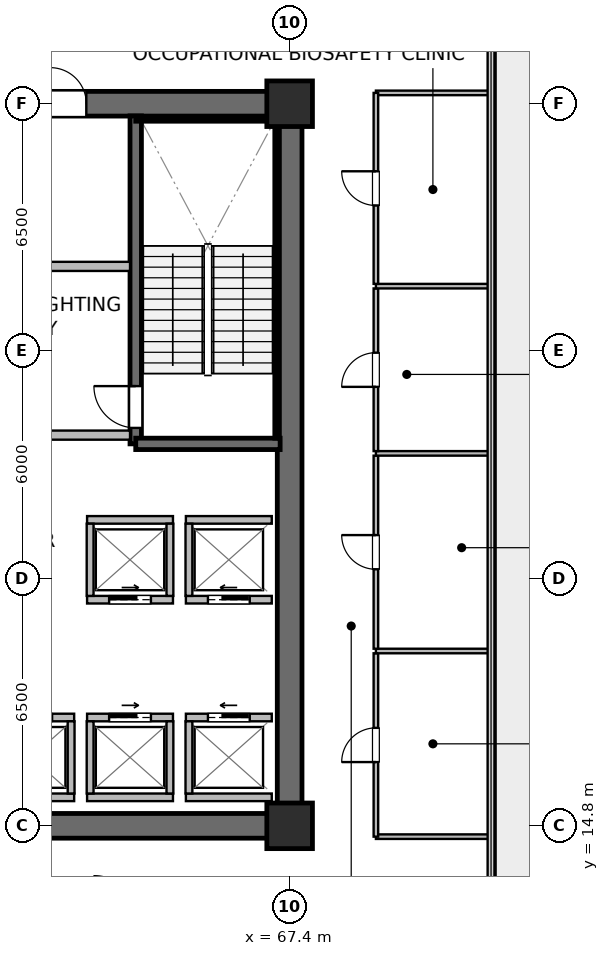
"""IFC4 building model, lengths in metres.
Left out: names, types, materials, properties, quantities, classifications, styles, units other than length and angle.
Written with IfcOpenShell. Run it as: python <this file> out.ifc"""

import sys

from ifc_helpers import new_model, si_unit, direction, frame, frame_2d, origin, origin_2d, place, context, subcontext, project, spatial, rectangle, extrude, source, transform, mapped, element, fill, save


model = new_model("IFC4")
c1 = context("Model", 3, precision=1e-05, world=origin(), true_north=direction((0.0, 1.0)))
c2 = subcontext(c1, "Body", "Model", "MODEL_VIEW")
j1 = project(units=[si_unit("LENGTHUNIT", "METRE"), si_unit("PLANEANGLEUNIT", "RADIAN")], contexts=[c1])
p1 = place(None, origin())
s1 = spatial("IfcSite", under=j1, at=p1, CompositionType="ELEMENT")
p2 = place(p1, origin())
s2 = spatial("IfcBuilding", under=s1, at=p2, CompositionType="ELEMENT")
p3 = place(p2, frame((0.0, 0.0, 100.3)))
s3 = spatial("IfcBuildingStorey", under=s2, at=p3, CompositionType="ELEMENT", Elevation=100.3)
p4 = place(p3, frame((52.275, 14.8, 0.0), z_axis=(0.0, 0.0, 1.0), x_axis=(1.0, 0.0, 0.0)))
e1 = element("IfcWall", 1, at=p4, inside=s3, PredefinedType="SHEAR", context=c2, shape_type="SweptSolid", body=[
    extrude(rectangle(XDim=15.45, YDim=0.65, at=frame_2d((7.725, 0.0))), origin(), (0.0, 0.0, 1.0), 4.49),
])
p5 = place(p3, frame((52.275, 33.8, 0.0), z_axis=(0.0, 0.0, 1.0), x_axis=(1.0, 0.0, 0.0)))
e2 = element("IfcWall", 2, at=p5, inside=s3, PredefinedType="SHEAR", context=c2, shape_type="SweptSolid", body=[
    extrude(rectangle(XDim=15.45, YDim=0.65, at=frame_2d((7.725, 0.0))), origin(), (0.0, 0.0, 1.0), 4.49),
])
p6 = place(p5, frame((8.825, 0.0, 0.0)))
e3 = element("IfcOpeningElement", 3, at=p6, cuts=e2, PredefinedType="OPENING", context=c2, shape_type="SweptSolid", body=[
    extrude(rectangle(XDim=0.95, YDim=2.15, at=frame_2d((0.475, 1.075))), frame((0.0, 0.335, 0.0), z_axis=(0.0, -1.0, 0.0), x_axis=(1.0, 0.0, 0.0)), (0.0, 0.0, 1.0), 0.67),
])
p7 = place(p5, frame((5.46, 0.0, 0.0)))
e4 = element("IfcOpeningElement", 4, at=p7, cuts=e2, PredefinedType="OPENING", context=c2, shape_type="SweptSolid", body=[
    extrude(rectangle(XDim=0.95, YDim=2.15, at=frame_2d((0.475, 1.075))), frame((0.0, 0.335, 0.0), z_axis=(0.0, -1.0, 0.0), x_axis=(1.0, 0.0, 0.0)), (0.0, 0.0, 1.0), 0.67),
])
p8 = place(p5, frame((2.06, 0.0, 0.0)))
e5 = element("IfcOpeningElement", 5, at=p8, cuts=e2, PredefinedType="OPENING", context=c2, shape_type="SweptSolid", body=[
    extrude(rectangle(XDim=0.95, YDim=2.15, at=frame_2d((0.475, 1.075))), frame((0.0, 0.335, 0.0), z_axis=(0.0, -1.0, 0.0), x_axis=(1.0, 0.0, 0.0)), (0.0, 0.0, 1.0), 0.67),
])
p9 = place(p3, frame((67.4, 15.125, 0.0), z_axis=(0.0, 0.0, 1.0), x_axis=(0.0, 1.0, 0.0)))
e6 = element("IfcWall", 6, at=p9, inside=s3, PredefinedType="SHEAR", context=c2, shape_type="SweptSolid", body=[
    extrude(rectangle(XDim=18.35, YDim=0.65, at=frame_2d((9.175, 0.0))), origin(), (0.0, 0.0, 1.0), 4.49),
])
p10 = place(p3, frame((63.35, 24.85, 0.0), z_axis=(0.0, 0.0, 1.0), x_axis=(0.0, 1.0, 0.0)))
e7 = element("IfcWall", 7, at=p10, inside=s3, PredefinedType="SHEAR", context=c2, shape_type="SweptSolid", body=[
    extrude(rectangle(XDim=8.63, YDim=0.3, at=frame_2d((4.315, 0.0))), origin(), (0.0, 0.0, 1.0), 4.49),
])
p11 = place(p10, frame((0.42, 0.0, 0.0)))
e8 = element("IfcOpeningElement", 8, at=p11, cuts=e7, PredefinedType="OPENING", context=c2, shape_type="SweptSolid", body=[
    extrude(rectangle(XDim=1.1, YDim=2.15, at=frame_2d((0.55, 1.075))), frame((0.0, 0.16, 0.0), z_axis=(0.0, -1.0, 0.0), x_axis=(1.0, 0.0, 0.0)), (0.0, 0.0, 1.0), 0.32),
])
p12 = place(p3, frame((63.35, 24.85, 0.0), z_axis=(0.0, 0.0, 1.0), x_axis=(1.0, 0.0, 0.0)))
e9 = element("IfcWall", 9, at=p12, inside=s3, PredefinedType="SHEAR", context=c2, shape_type="SweptSolid", body=[
    extrude(rectangle(XDim=3.8, YDim=0.3, at=frame_2d((1.9, 0.0))), origin(), (0.0, 0.0, 1.0), 4.49),
])
p13 = place(p3, frame((63.35, 33.4, 0.0), z_axis=(0.0, 0.0, 1.0), x_axis=(1.0, 0.0, 0.0)))
e10 = element("IfcWall", 10, at=p13, inside=s3, PredefinedType="SOLIDWALL", context=c2, shape_type="SweptSolid", body=[
    extrude(rectangle(XDim=3.72, YDim=0.12, at=frame_2d((1.86, 0.0))), origin(), (0.0, 0.0, 1.0), 4.49),
])
p14 = place(p3, frame((67.07, 25.0, 0.0), z_axis=(0.0, 0.0, 1.0), x_axis=(0.0, 1.0, 0.0)))
e11 = element("IfcWall", 11, at=p14, inside=s3, PredefinedType="SOLIDWALL", context=c2, shape_type="SweptSolid", body=[
    extrude(rectangle(XDim=8.32, YDim=0.12, at=frame_2d((4.16, 0.0))), origin(), (0.0, 0.0, 1.0), 4.49),
])
m1 = source(origin(), c2, "Body", "SweptSolid", [
    extrude(rectangle(XDim=1.2, YDim=1.2, at=origin_2d()), origin(), (0.0, 0.0, 1.0), 4.8),
])
for number, where, z_axis, x_axis in (
    (12, (67.4, 14.8, 0.0), (0.0, 0.0, 1.0), (1.0, 0.0, 0.0)),
    (13, (67.4, 33.8, 0.0), (0.0, 0.0, 1.0), (1.0, 0.0, 0.0)),
):
    element("IfcColumn", number, at=place(p3, frame(where, z_axis=z_axis, x_axis=x_axis)), inside=s3, PredefinedType="COLUMN", context=c2, shape_type="MappedRepresentation", body=[
        mapped(m1, transform((0.0, 0.0, 0.0), scale=1.0)),
    ])
p15 = place(p3, frame((56.28, 25.08, 0.0), z_axis=(0.0, 0.0, 1.0), x_axis=(1.0, 0.0, 0.0)))
e14 = element("IfcWall", 14, at=p15, inside=s3, PredefinedType="SOLIDWALL", context=c2, shape_type="SweptSolid", body=[
    extrude(rectangle(XDim=6.92, YDim=0.24, at=frame_2d((3.46, 0.0))), origin(), (0.0, 0.0, 1.0), 3.825),
])
p16 = place(p15, frame((2.6, 0.0, 0.0)))
e15 = element("IfcOpeningElement", 15, at=p16, cuts=e14, PredefinedType="OPENING", context=c2, shape_type="SweptSolid", body=[
    extrude(rectangle(XDim=1.2, YDim=2.16, at=frame_2d((0.6, 1.08))), frame((0.0, 0.13, 0.0), z_axis=(0.0, -1.0, 0.0), x_axis=(1.0, 0.0, 0.0)), (0.0, 0.0, 1.0), 0.26),
])
p17 = place(p3, frame((56.28, 29.52, 0.0), z_axis=(0.0, 0.0, 1.0), x_axis=(1.0, 0.0, 0.0)))
e16 = element("IfcWall", 16, at=p17, inside=s3, PredefinedType="SOLIDWALL", context=c2, shape_type="SweptSolid", body=[
    extrude(rectangle(XDim=6.92, YDim=0.24, at=frame_2d((3.46, 0.0))), origin(), (0.0, 0.0, 1.0), 3.825),
])
p18 = place(p3, frame((64.67, 17.65, 0.0), z_axis=(0.0, 0.0, 1.0), x_axis=(1.0, 0.0, 0.0)))
e17 = element("IfcWall", 17, at=p18, inside=s3, PredefinedType="SOLIDWALL", context=c2, shape_type="SweptSolid", body=[
    extrude(rectangle(XDim=2.26, YDim=0.2, at=frame_2d((1.13, 0.0))), origin(), (0.0, 0.0, 1.0), 4.49),
])
p19 = place(p18, frame((0.58, 0.0, 0.0)))
e18 = element("IfcOpeningElement", 18, at=p19, cuts=e17, PredefinedType="OPENING", context=c2, shape_type="SweptSolid", body=[
    extrude(rectangle(XDim=1.1, YDim=2.22, at=frame_2d((0.55, 1.11))), frame((0.0, 0.11, 0.0), z_axis=(0.0, -1.0, 0.0), x_axis=(1.0, 0.0, 0.0)), (0.0, 0.0, 1.0), 0.22),
])
p20 = place(p3, frame((64.67, 15.55, 0.0), z_axis=(0.0, 0.0, 1.0), x_axis=(1.0, 0.0, 0.0)))
e19 = element("IfcWall", 19, at=p20, inside=s3, PredefinedType="SOLIDWALL", context=c2, shape_type="SweptSolid", body=[
    extrude(rectangle(XDim=2.26, YDim=0.2, at=frame_2d((1.13, 0.0))), origin(), (0.0, 0.0, 1.0), 4.49),
])
p21 = place(p3, frame((64.75, 15.65, 0.0), z_axis=(0.0, 0.0, 1.0), x_axis=(0.0, 1.0, 0.0)))
e20 = element("IfcWall", 20, at=p21, inside=s3, PredefinedType="SOLIDWALL", context=c2, shape_type="SweptSolid", body=[
    extrude(rectangle(XDim=1.9, YDim=0.18, at=frame_2d((0.95, 0.0))), origin(), (0.0, 0.0, 1.0), 4.49),
])
p22 = place(p3, frame((62.07, 17.65, 0.0), z_axis=(0.0, 0.0, 1.0), x_axis=(1.0, 0.0, 0.0)))
e21 = element("IfcWall", 21, at=p22, inside=s3, PredefinedType="SOLIDWALL", context=c2, shape_type="SweptSolid", body=[
    extrude(rectangle(XDim=2.26, YDim=0.2, at=frame_2d((1.13, 0.0))), origin(), (0.0, 0.0, 1.0), 4.49),
])
p23 = place(p22, frame((0.58, 0.0, 0.0)))
e22 = element("IfcOpeningElement", 22, at=p23, cuts=e21, PredefinedType="OPENING", context=c2, shape_type="SweptSolid", body=[
    extrude(rectangle(XDim=1.1, YDim=2.22, at=frame_2d((0.55, 1.11))), frame((0.0, 0.11, 0.0), z_axis=(0.0, -1.0, 0.0), x_axis=(1.0, 0.0, 0.0)), (0.0, 0.0, 1.0), 0.22),
])
p24 = place(p3, frame((62.07, 15.55, 0.0), z_axis=(0.0, 0.0, 1.0), x_axis=(1.0, 0.0, 0.0)))
e23 = element("IfcWall", 23, at=p24, inside=s3, PredefinedType="SOLIDWALL", context=c2, shape_type="SweptSolid", body=[
    extrude(rectangle(XDim=2.26, YDim=0.2, at=frame_2d((1.13, 0.0))), origin(), (0.0, 0.0, 1.0), 4.49),
])
for number, where, z_axis, x_axis in (
    (24, (62.15, 15.65, 0.0), (0.0, 0.0, 1.0), (0.0, 1.0, 0.0)),
    (25, (64.25, 15.65, 0.0), (0.0, 0.0, 1.0), (0.0, 1.0, 0.0)),
):
    element("IfcWall", number, at=place(p3, frame(where, z_axis=z_axis, x_axis=x_axis)), inside=s3, PredefinedType="SOLIDWALL", context=c2, shape_type="SweptSolid", body=[
        extrude(rectangle(XDim=1.9, YDim=0.18, at=frame_2d((0.95, 0.0))), origin(), (0.0, 0.0, 1.0), 4.49),
    ])
p25 = place(p3, frame((59.47, 17.65, 0.0), z_axis=(0.0, 0.0, 1.0), x_axis=(1.0, 0.0, 0.0)))
e26 = element("IfcWall", 26, at=p25, inside=s3, PredefinedType="SOLIDWALL", context=c2, shape_type="SweptSolid", body=[
    extrude(rectangle(XDim=2.26, YDim=0.2, at=frame_2d((1.13, 0.0))), origin(), (0.0, 0.0, 1.0), 3.825),
])
p26 = place(p25, frame((0.58, 0.0, 0.0)))
e27 = element("IfcOpeningElement", 27, at=p26, cuts=e26, PredefinedType="OPENING", context=c2, shape_type="SweptSolid", body=[
    extrude(rectangle(XDim=1.1, YDim=2.22, at=frame_2d((0.55, 1.11))), frame((0.0, 0.11, 0.0), z_axis=(0.0, -1.0, 0.0), x_axis=(1.0, 0.0, 0.0)), (0.0, 0.0, 1.0), 0.22),
])
p27 = place(p3, frame((59.47, 15.55, 0.0), z_axis=(0.0, 0.0, 1.0), x_axis=(1.0, 0.0, 0.0)))
e28 = element("IfcWall", 28, at=p27, inside=s3, PredefinedType="SOLIDWALL", context=c2, shape_type="SweptSolid", body=[
    extrude(rectangle(XDim=2.26, YDim=0.2, at=frame_2d((1.13, 0.0))), origin(), (0.0, 0.0, 1.0), 3.825),
])
p28 = place(p3, frame((61.65, 15.65, 0.0), z_axis=(0.0, 0.0, 1.0), x_axis=(0.0, 1.0, 0.0)))
e29 = element("IfcWall", 29, at=p28, inside=s3, PredefinedType="SOLIDWALL", context=c2, shape_type="SweptSolid", body=[
    extrude(rectangle(XDim=1.9, YDim=0.18, at=frame_2d((0.95, 0.0))), origin(), (0.0, 0.0, 1.0), 4.49),
])
p29 = place(p3, frame((64.67, 20.75, 0.0), z_axis=(0.0, 0.0, 1.0), x_axis=(1.0, 0.0, 0.0)))
e30 = element("IfcWall", 30, at=p29, inside=s3, PredefinedType="SOLIDWALL", context=c2, shape_type="SweptSolid", body=[
    extrude(rectangle(XDim=2.26, YDim=0.2, at=frame_2d((1.13, 0.0))), origin(), (0.0, 0.0, 1.0), 4.49),
])
p30 = place(p29, frame((0.58, 0.0, 0.0)))
e31 = element("IfcOpeningElement", 31, at=p30, cuts=e30, PredefinedType="OPENING", context=c2, shape_type="SweptSolid", body=[
    extrude(rectangle(XDim=1.1, YDim=2.22, at=frame_2d((0.55, 1.11))), frame((0.0, 0.11, 0.0), z_axis=(0.0, -1.0, 0.0), x_axis=(1.0, 0.0, 0.0)), (0.0, 0.0, 1.0), 0.22),
])
p31 = place(p3, frame((64.67, 22.85, 0.0), z_axis=(0.0, 0.0, 1.0), x_axis=(1.0, 0.0, 0.0)))
e32 = element("IfcWall", 32, at=p31, inside=s3, PredefinedType="SOLIDWALL", context=c2, shape_type="SweptSolid", body=[
    extrude(rectangle(XDim=2.26, YDim=0.2, at=frame_2d((1.13, 0.0))), origin(), (0.0, 0.0, 1.0), 4.49),
])
p32 = place(p3, frame((64.75, 20.85, 0.0), z_axis=(0.0, 0.0, 1.0), x_axis=(0.0, 1.0, 0.0)))
e33 = element("IfcWall", 33, at=p32, inside=s3, PredefinedType="SOLIDWALL", context=c2, shape_type="SweptSolid", body=[
    extrude(rectangle(XDim=1.9, YDim=0.18, at=frame_2d((0.95, 0.0))), origin(), (0.0, 0.0, 1.0), 4.49),
])
p33 = place(p3, frame((62.07, 20.75, 0.0), z_axis=(0.0, 0.0, 1.0), x_axis=(1.0, 0.0, 0.0)))
e34 = element("IfcWall", 34, at=p33, inside=s3, PredefinedType="SOLIDWALL", context=c2, shape_type="SweptSolid", body=[
    extrude(rectangle(XDim=2.26, YDim=0.2, at=frame_2d((1.13, 0.0))), origin(), (0.0, 0.0, 1.0), 4.49),
])
p34 = place(p33, frame((0.58, 0.0, 0.0)))
e35 = element("IfcOpeningElement", 35, at=p34, cuts=e34, PredefinedType="OPENING", context=c2, shape_type="SweptSolid", body=[
    extrude(rectangle(XDim=1.1, YDim=2.22, at=frame_2d((0.55, 1.11))), frame((0.0, 0.11, 0.0), z_axis=(0.0, -1.0, 0.0), x_axis=(1.0, 0.0, 0.0)), (0.0, 0.0, 1.0), 0.22),
])
p35 = place(p3, frame((62.07, 22.85, 0.0), z_axis=(0.0, 0.0, 1.0), x_axis=(1.0, 0.0, 0.0)))
e36 = element("IfcWall", 36, at=p35, inside=s3, PredefinedType="SOLIDWALL", context=c2, shape_type="SweptSolid", body=[
    extrude(rectangle(XDim=2.26, YDim=0.2, at=frame_2d((1.13, 0.0))), origin(), (0.0, 0.0, 1.0), 4.49),
])
for number, where, z_axis, x_axis in (
    (37, (62.15, 20.85, 0.0), (0.0, 0.0, 1.0), (0.0, 1.0, 0.0)),
    (38, (64.25, 20.85, 0.0), (0.0, 0.0, 1.0), (0.0, 1.0, 0.0)),
):
    element("IfcWall", number, at=place(p3, frame(where, z_axis=z_axis, x_axis=x_axis)), inside=s3, PredefinedType="SOLIDWALL", context=c2, shape_type="SweptSolid", body=[
        extrude(rectangle(XDim=1.9, YDim=0.18, at=frame_2d((0.95, 0.0))), origin(), (0.0, 0.0, 1.0), 4.49),
    ])
for number, where, z_axis, x_axis in (
    (39, (69.67, 14.515, 0.0), (0.0, 0.0, 1.0), (1.0, 0.0, 0.0)),
    (40, (69.67, 34.085, 0.0), (0.0, 0.0, 1.0), (1.0, 0.0, 0.0)),
):
    element("IfcWall", number, at=place(p3, frame(where, z_axis=z_axis, x_axis=x_axis)), inside=s3, PredefinedType="PARTITIONING", context=c2, shape_type="SweptSolid", body=[
        extrude(rectangle(XDim=3.02, YDim=0.12, at=frame_2d((1.51, 0.0))), origin(), (0.0, 0.0, 1.0), 4.49),
    ])
p36 = place(p3, frame((69.67, 14.515, 0.0), z_axis=(0.0, 0.0, 1.0), x_axis=(0.0, 1.0, 0.0)))
e41 = element("IfcWall", 41, at=p36, inside=s3, PredefinedType="PARTITIONING", context=c2, shape_type="SweptSolid", body=[
    extrude(rectangle(XDim=4.825, YDim=0.12, at=frame_2d((2.413, 0.0))), origin(), (0.0, 0.0, 1.0), 4.49),
])
p37 = place(p36, frame((1.962, 0.0, 0.0)))
e42 = element("IfcOpeningElement", 42, at=p37, cuts=e41, PredefinedType="OPENING", context=c2, shape_type="SweptSolid", body=[
    extrude(rectangle(XDim=0.9, YDim=2.1, at=frame_2d((0.45, 1.05))), frame((0.0, 0.07, 0.0), z_axis=(0.0, -1.0, 0.0), x_axis=(1.0, 0.0, 0.0)), (0.0, 0.0, 1.0), 0.14),
])
p38 = place(p3, frame((69.67, 19.4, 0.0), z_axis=(0.0, 0.0, 1.0), x_axis=(1.0, 0.0, 0.0)))
e43 = element("IfcWall", 43, at=p38, inside=s3, PredefinedType="PARTITIONING", context=c2, shape_type="SweptSolid", body=[
    extrude(rectangle(XDim=3.02, YDim=0.12, at=frame_2d((1.51, 0.0))), origin(), (0.0, 0.0, 1.0), 4.49),
])
p39 = place(p3, frame((69.67, 19.46, 0.0), z_axis=(0.0, 0.0, 1.0), x_axis=(0.0, 1.0, 0.0)))
e44 = element("IfcWall", 44, at=p39, inside=s3, PredefinedType="PARTITIONING", context=c2, shape_type="SweptSolid", body=[
    extrude(rectangle(XDim=5.08, YDim=0.12, at=frame_2d((2.54, 0.0))), origin(), (0.0, 0.0, 1.0), 4.49),
])
p40 = place(p39, frame((2.09, 0.0, 0.0)))
e45 = element("IfcOpeningElement", 45, at=p40, cuts=e44, PredefinedType="OPENING", context=c2, shape_type="SweptSolid", body=[
    extrude(rectangle(XDim=0.9, YDim=2.1, at=frame_2d((0.45, 1.05))), frame((0.0, 0.07, 0.0), z_axis=(0.0, -1.0, 0.0), x_axis=(1.0, 0.0, 0.0)), (0.0, 0.0, 1.0), 0.14),
])
p41 = place(p3, frame((69.67, 24.6, 0.0), z_axis=(0.0, 0.0, 1.0), x_axis=(1.0, 0.0, 0.0)))
e46 = element("IfcWall", 46, at=p41, inside=s3, PredefinedType="PARTITIONING", context=c2, shape_type="SweptSolid", body=[
    extrude(rectangle(XDim=3.02, YDim=0.12, at=frame_2d((1.51, 0.0))), origin(), (0.0, 0.0, 1.0), 4.49),
])
p42 = place(p3, frame((69.67, 24.66, 0.0), z_axis=(0.0, 0.0, 1.0), x_axis=(0.0, 1.0, 0.0)))
e47 = element("IfcWall", 47, at=p42, inside=s3, PredefinedType="PARTITIONING", context=c2, shape_type="SweptSolid", body=[
    extrude(rectangle(XDim=4.28, YDim=0.12, at=frame_2d((2.14, 0.0))), origin(), (0.0, 0.0, 1.0), 4.49),
])
p43 = place(p42, frame((1.69, 0.0, 0.0)))
e48 = element("IfcOpeningElement", 48, at=p43, cuts=e47, PredefinedType="OPENING", context=c2, shape_type="SweptSolid", body=[
    extrude(rectangle(XDim=0.9, YDim=2.1, at=frame_2d((0.45, 1.05))), frame((0.0, 0.07, 0.0), z_axis=(0.0, -1.0, 0.0), x_axis=(1.0, 0.0, 0.0)), (0.0, 0.0, 1.0), 0.14),
])
p44 = place(p3, frame((69.67, 29.0, 0.0), z_axis=(0.0, 0.0, 1.0), x_axis=(1.0, 0.0, 0.0)))
e49 = element("IfcWall", 49, at=p44, inside=s3, PredefinedType="PARTITIONING", context=c2, shape_type="SweptSolid", body=[
    extrude(rectangle(XDim=3.02, YDim=0.12, at=frame_2d((1.51, 0.0))), origin(), (0.0, 0.0, 1.0), 4.49),
])
p45 = place(p3, frame((69.67, 29.06, 0.0), z_axis=(0.0, 0.0, 1.0), x_axis=(0.0, 1.0, 0.0)))
e50 = element("IfcWall", 50, at=p45, inside=s3, PredefinedType="PARTITIONING", context=c2, shape_type="SweptSolid", body=[
    extrude(rectangle(XDim=5.025, YDim=0.12, at=frame_2d((2.512, 0.0))), origin(), (0.0, 0.0, 1.0), 4.49),
])
p46 = place(p45, frame((2.062, 0.0, 0.0)))
e51 = element("IfcOpeningElement", 51, at=p46, cuts=e50, PredefinedType="OPENING", context=c2, shape_type="SweptSolid", body=[
    extrude(rectangle(XDim=0.9, YDim=2.1, at=frame_2d((0.45, 1.05))), frame((0.0, 0.07, 0.0), z_axis=(0.0, -1.0, 0.0), x_axis=(1.0, 0.0, 0.0)), (0.0, 0.0, 1.0), 0.14),
])
m2 = source(origin(), c2, "Body", "SweptSolid", [
    extrude(rectangle(XDim=1.1, YDim=2.15, at=frame_2d((0.55, 1.075))), frame((0.0, 0.025, 0.0), z_axis=(0.0, -1.0, 0.0), x_axis=(1.0, 0.0, 0.0)), (0.0, 0.0, 1.0), 0.05),
])
p47 = place(p11, origin())
e52 = element("IfcDoor", 52, at=p47, inside=s3, OperationType="SINGLE_SWING_RIGHT", PredefinedType="DOOR", context=c2, shape_type="MappedRepresentation", body=[
    mapped(m2, transform((0.0, 0.0, 0.0), scale=1.0)),
])
fill(e8, e52)
m3 = source(origin(), c2, "Body", "SweptSolid", [
    extrude(rectangle(XDim=1.1, YDim=2.22, at=frame_2d((0.55, 1.11))), frame((0.0, 0.025, 0.0), z_axis=(0.0, -1.0, 0.0), x_axis=(1.0, 0.0, 0.0)), (0.0, 0.0, 1.0), 0.05),
])
p48 = place(p19, origin())
e53 = element("IfcDoor", 53, at=p48, inside=s3, OperationType="SLIDING_TO_LEFT", PredefinedType="USERDEFINED", context=c2, shape_type="MappedRepresentation", body=[
    mapped(m3, transform((0.0, 0.0, 0.0), scale=1.0)),
])
fill(e18, e53)
p49 = place(p23, origin())
e54 = element("IfcDoor", 54, at=p49, inside=s3, OperationType="SLIDING_TO_RIGHT", PredefinedType="USERDEFINED", context=c2, shape_type="MappedRepresentation", body=[
    mapped(m3, transform((0.0, 0.0, 0.0), scale=1.0)),
])
fill(e22, e54)
p50 = place(p26, origin())
e55 = element("IfcDoor", 55, at=p50, inside=s3, OperationType="SLIDING_TO_LEFT", PredefinedType="USERDEFINED", context=c2, shape_type="MappedRepresentation", body=[
    mapped(m3, transform((0.0, 0.0, 0.0), scale=1.0)),
])
fill(e27, e55)
p51 = place(p30, origin())
e56 = element("IfcDoor", 56, at=p51, inside=s3, OperationType="SLIDING_TO_LEFT", PredefinedType="USERDEFINED", context=c2, shape_type="MappedRepresentation", body=[
    mapped(m3, transform((0.0, 0.0, 0.0), scale=1.0)),
])
fill(e31, e56)
p52 = place(p34, origin())
e57 = element("IfcDoor", 57, at=p52, inside=s3, OperationType="SLIDING_TO_RIGHT", PredefinedType="USERDEFINED", context=c2, shape_type="MappedRepresentation", body=[
    mapped(m3, transform((0.0, 0.0, 0.0), scale=1.0)),
])
fill(e35, e57)
m4 = source(origin(), c2, "Body", "SweptSolid", [
    extrude(rectangle(XDim=0.95, YDim=2.15, at=frame_2d((0.475, 1.075))), frame((0.0, 0.025, 0.0), z_axis=(0.0, -1.0, 0.0), x_axis=(1.0, 0.0, 0.0)), (0.0, 0.0, 1.0), 0.05),
])
p53 = place(p6, origin())
e58 = element("IfcDoor", 58, at=p53, inside=s3, OperationType="SINGLE_SWING_LEFT", PredefinedType="DOOR", context=c2, shape_type="MappedRepresentation", body=[
    mapped(m4, transform((0.0, 0.0, 0.0), scale=1.0)),
])
fill(e3, e58)
m5 = source(origin(), c2, "Body", "SweptSolid", [
    extrude(rectangle(XDim=0.9, YDim=2.1, at=frame_2d((0.45, 1.05))), frame((0.0, 0.025, 0.0), z_axis=(0.0, -1.0, 0.0), x_axis=(1.0, 0.0, 0.0)), (0.0, 0.0, 1.0), 0.05),
])
p54 = place(p37, origin())
e59 = element("IfcDoor", 59, at=p54, inside=s3, OperationType="SINGLE_SWING_LEFT", PredefinedType="DOOR", context=c2, shape_type="MappedRepresentation", body=[
    mapped(m5, transform((0.0, 0.0, 0.0), scale=1.0)),
])
fill(e42, e59)
p55 = place(p40, origin())
e60 = element("IfcDoor", 60, at=p55, inside=s3, OperationType="SINGLE_SWING_RIGHT", PredefinedType="DOOR", context=c2, shape_type="MappedRepresentation", body=[
    mapped(m5, transform((0.0, 0.0, 0.0), scale=1.0)),
])
fill(e45, e60)
p56 = place(p43, origin())
e61 = element("IfcDoor", 61, at=p56, inside=s3, OperationType="SINGLE_SWING_LEFT", PredefinedType="DOOR", context=c2, shape_type="MappedRepresentation", body=[
    mapped(m5, transform((0.0, 0.0, 0.0), scale=1.0)),
])
fill(e48, e61)
p57 = place(p46, origin())
e62 = element("IfcDoor", 62, at=p57, inside=s3, OperationType="SINGLE_SWING_RIGHT", PredefinedType="DOOR", context=c2, shape_type="MappedRepresentation", body=[
    mapped(m5, transform((0.0, 0.0, 0.0), scale=1.0)),
])
fill(e51, e62)
save(model, sys.argv[1])
